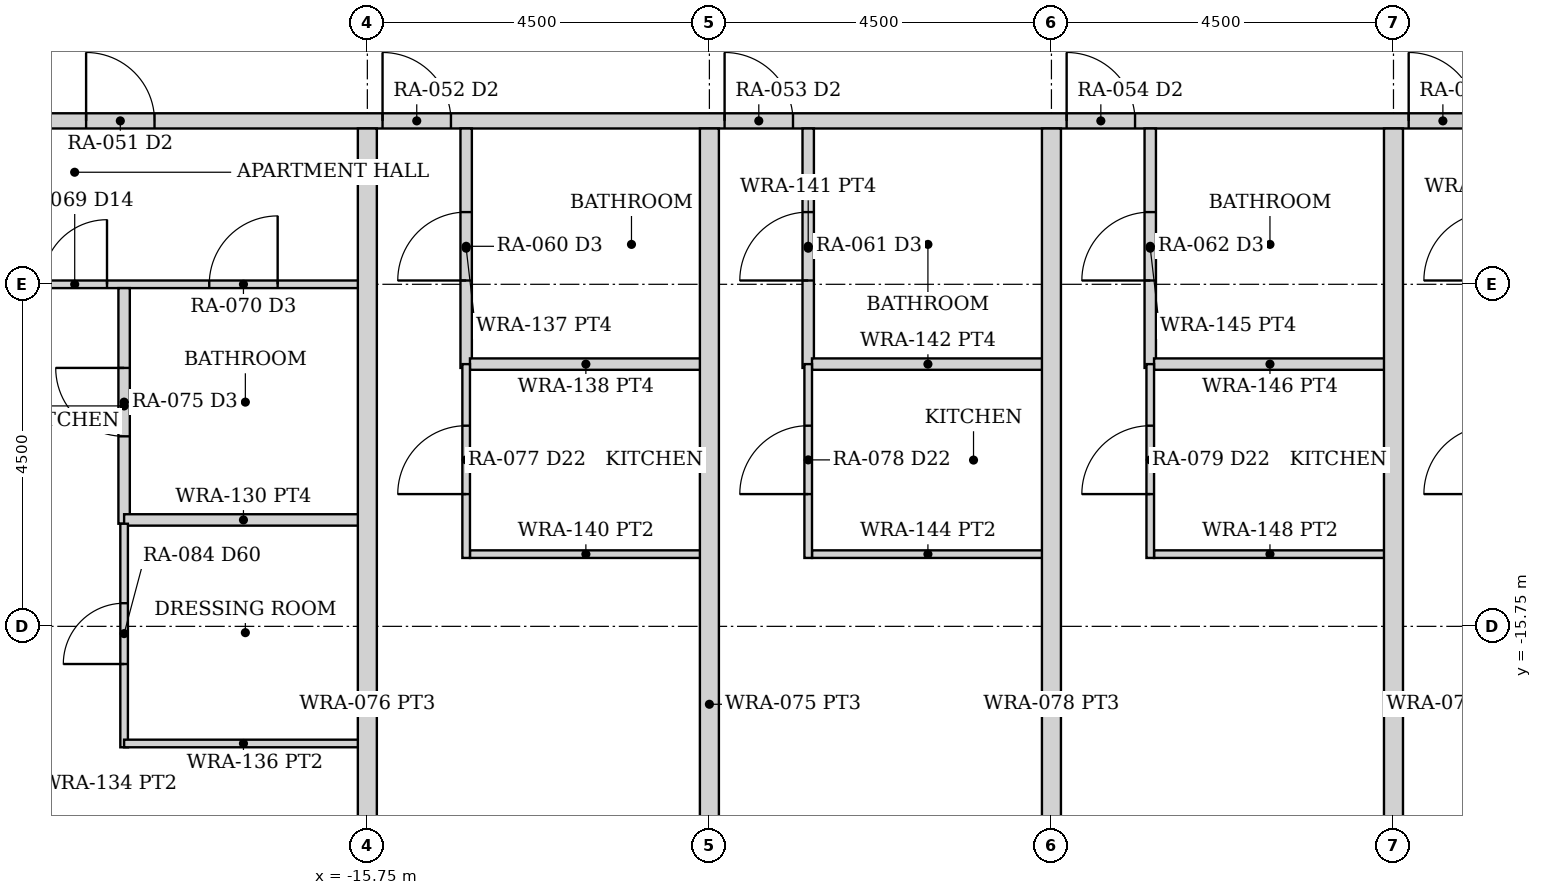
"""IFC4 building model, lengths in metres.
Left out: names, types, materials, properties, quantities, classifications, styles, units other than length and angle.
Written with IfcOpenShell. Run it as: python <this file> out.ifc"""

import sys

from ifc_helpers import new_model, si_unit, direction, frame, frame_2d, origin, place, context, subcontext, project, spatial, rectangle, extrude, element, fill, save


model = new_model("IFC4")
c1 = context("Model", 3, precision=1e-05, world=origin(), true_north=direction((0.0, 1.0)))
c2 = subcontext(c1, "Body", "Model", "MODEL_VIEW")
j1 = project(units=[si_unit("LENGTHUNIT", "METRE"), si_unit("PLANEANGLEUNIT", "RADIAN")], contexts=[c1])
p1 = place(None, origin())
s1 = spatial("IfcSite", under=j1, at=p1, CompositionType="ELEMENT")
p2 = place(p1, origin())
s2 = spatial("IfcBuilding", under=s1, at=p2, CompositionType="ELEMENT")
p3 = place(p2, frame((0.0, 0.0, 30.0)))
s3 = spatial("IfcBuildingStorey", under=s2, at=p3, CompositionType="ELEMENT", Elevation=30.0)
p4 = place(p3, frame((-24.55, -9.1, 0.0), z_axis=(0.0, 0.0, 1.0), x_axis=(1.0, 0.0, 0.0)))
e1 = element("IfcWall", 1, at=p4, inside=s3, PredefinedType="PARTITIONING", context=c2, shape_type="SweptSolid", body=[
    extrude(rectangle(XDim=49.1, YDim=0.2, at=frame_2d((24.55, 0.0))), origin(), (0.0, 0.0, 1.0), 2.373),
])
p5 = place(p4, frame((5.1, 0.0, 0.0)))
e2 = element("IfcOpeningElement", 2, at=p5, cuts=e1, PredefinedType="OPENING", context=c2, shape_type="SweptSolid", body=[
    extrude(rectangle(XDim=0.9, YDim=2.1, at=frame_2d((0.45, 1.05))), frame((0.0, 0.11, 0.0), z_axis=(0.0, -1.0, 0.0), x_axis=(1.0, 0.0, 0.0)), (0.0, 0.0, 1.0), 0.22),
])
p6 = place(p4, frame((9.0, 0.0, 0.0)))
e3 = element("IfcOpeningElement", 3, at=p6, cuts=e1, PredefinedType="OPENING", context=c2, shape_type="SweptSolid", body=[
    extrude(rectangle(XDim=0.9, YDim=2.1, at=frame_2d((0.45, 1.05))), frame((0.0, 0.11, 0.0), z_axis=(0.0, -1.0, 0.0), x_axis=(1.0, 0.0, 0.0)), (0.0, 0.0, 1.0), 0.22),
])
p7 = place(p4, frame((13.5, 0.0, 0.0)))
e4 = element("IfcOpeningElement", 4, at=p7, cuts=e1, PredefinedType="OPENING", context=c2, shape_type="SweptSolid", body=[
    extrude(rectangle(XDim=0.9, YDim=2.1, at=frame_2d((0.45, 1.05))), frame((0.0, 0.11, 0.0), z_axis=(0.0, -1.0, 0.0), x_axis=(1.0, 0.0, 0.0)), (0.0, 0.0, 1.0), 0.22),
])
p8 = place(p4, frame((18.0, 0.0, 0.0)))
e5 = element("IfcOpeningElement", 5, at=p8, cuts=e1, PredefinedType="OPENING", context=c2, shape_type="SweptSolid", body=[
    extrude(rectangle(XDim=0.9, YDim=2.1, at=frame_2d((0.45, 1.05))), frame((0.0, 0.11, 0.0), z_axis=(0.0, -1.0, 0.0), x_axis=(1.0, 0.0, 0.0)), (0.0, 0.0, 1.0), 0.22),
])
p9 = place(p4, frame((22.5, 0.0, 0.0)))
e6 = element("IfcOpeningElement", 6, at=p9, cuts=e1, PredefinedType="OPENING", context=c2, shape_type="SweptSolid", body=[
    extrude(rectangle(XDim=0.9, YDim=2.1, at=frame_2d((0.45, 1.05))), frame((0.0, 0.11, 0.0), z_axis=(0.0, -1.0, 0.0), x_axis=(1.0, 0.0, 0.0)), (0.0, 0.0, 1.0), 0.22),
])
p10 = place(p4, frame((27.0, 0.0, 0.0)))
e7 = element("IfcOpeningElement", 7, at=p10, cuts=e1, PredefinedType="OPENING", context=c2, shape_type="SweptSolid", body=[
    extrude(rectangle(XDim=0.9, YDim=2.1, at=frame_2d((0.45, 1.05))), frame((0.0, 0.11, 0.0), z_axis=(0.0, -1.0, 0.0), x_axis=(1.0, 0.0, 0.0)), (0.0, 0.0, 1.0), 0.22),
])
p11 = place(p4, frame((31.5, 0.0, 0.0)))
e8 = element("IfcOpeningElement", 8, at=p11, cuts=e1, PredefinedType="OPENING", context=c2, shape_type="SweptSolid", body=[
    extrude(rectangle(XDim=0.9, YDim=2.1, at=frame_2d((0.45, 1.05))), frame((0.0, 0.11, 0.0), z_axis=(0.0, -1.0, 0.0), x_axis=(1.0, 0.0, 0.0)), (0.0, 0.0, 1.0), 0.22),
])
p12 = place(p4, frame((36.0, 0.0, 0.0)))
e9 = element("IfcOpeningElement", 9, at=p12, cuts=e1, PredefinedType="OPENING", context=c2, shape_type="SweptSolid", body=[
    extrude(rectangle(XDim=0.9, YDim=2.1, at=frame_2d((0.45, 1.05))), frame((0.0, 0.11, 0.0), z_axis=(0.0, -1.0, 0.0), x_axis=(1.0, 0.0, 0.0)), (0.0, 0.0, 1.0), 0.22),
])
p13 = place(p4, frame((43.1, 0.0, 0.0)))
e10 = element("IfcOpeningElement", 10, at=p13, cuts=e1, PredefinedType="OPENING", context=c2, shape_type="SweptSolid", body=[
    extrude(rectangle(XDim=0.9, YDim=2.1, at=frame_2d((0.45, 1.05))), frame((0.0, 0.11, 0.0), z_axis=(0.0, -1.0, 0.0), x_axis=(1.0, 0.0, 0.0)), (0.0, 0.0, 1.0), 0.22),
])
p14 = place(p3, frame((-24.35, -11.25, 0.0), z_axis=(0.0, 0.0, 1.0), x_axis=(1.0, 0.0, 0.0)))
e11 = element("IfcWall", 11, at=p14, inside=s3, PredefinedType="PARTITIONING", context=c2, shape_type="SweptSolid", body=[
    extrude(rectangle(XDim=8.5, YDim=0.1, at=frame_2d((4.25, 0.0))), origin(), (0.0, 0.0, 1.0), 2.373),
])
p15 = place(p14, frame((2.375, 0.0, 0.0)))
e12 = element("IfcOpeningElement", 12, at=p15, cuts=e11, PredefinedType="OPENING", context=c2, shape_type="SweptSolid", body=[
    extrude(rectangle(XDim=0.9, YDim=2.1, at=frame_2d((0.45, 1.05))), frame((0.0, 0.06, 0.0), z_axis=(0.0, -1.0, 0.0), x_axis=(1.0, 0.0, 0.0)), (0.0, 0.0, 1.0), 0.12),
])
p16 = place(p14, frame((0.35, 0.0, 0.0)))
e13 = element("IfcOpeningElement", 13, at=p16, cuts=e11, PredefinedType="OPENING", context=c2, shape_type="SweptSolid", body=[
    extrude(rectangle(XDim=0.9, YDim=2.1, at=frame_2d((0.45, 1.05))), frame((0.0, 0.06, 0.0), z_axis=(0.0, -1.0, 0.0), x_axis=(1.0, 0.0, 0.0)), (0.0, 0.0, 1.0), 0.12),
])
p17 = place(p14, frame((4.325, 0.0, 0.0)))
e14 = element("IfcOpeningElement", 14, at=p17, cuts=e11, PredefinedType="OPENING", context=c2, shape_type="SweptSolid", body=[
    extrude(rectangle(XDim=0.85, YDim=2.1, at=frame_2d((0.425, 1.05))), frame((0.0, 0.06, 0.0), z_axis=(0.0, -1.0, 0.0), x_axis=(1.0, 0.0, 0.0)), (0.0, 0.0, 1.0), 0.12),
])
p18 = place(p14, frame((6.52, 0.0, 0.0)))
e15 = element("IfcOpeningElement", 15, at=p18, cuts=e11, PredefinedType="OPENING", context=c2, shape_type="SweptSolid", body=[
    extrude(rectangle(XDim=0.9, YDim=2.1, at=frame_2d((0.45, 1.05))), frame((0.0, 0.06, 0.0), z_axis=(0.0, -1.0, 0.0), x_axis=(1.0, 0.0, 0.0)), (0.0, 0.0, 1.0), 0.12),
])
p19 = place(p3, frame((-18.95, -14.4, 0.0), z_axis=(0.0, 0.0, 1.0), x_axis=(0.0, 1.0, 0.0)))
e16 = element("IfcWall", 16, at=p19, inside=s3, PredefinedType="PARTITIONING", context=c2, shape_type="SweptSolid", body=[
    extrude(rectangle(XDim=3.1, YDim=0.15, at=frame_2d((1.55, 0.0))), origin(), (0.0, 0.0, 1.0), 2.373),
])
p20 = place(p19, frame((1.15, 0.0, 0.0)))
e17 = element("IfcOpeningElement", 17, at=p20, cuts=e16, PredefinedType="OPENING", context=c2, shape_type="SweptSolid", body=[
    extrude(rectangle(XDim=0.9, YDim=2.1, at=frame_2d((0.45, 1.05))), frame((0.0, 0.085, 0.0), z_axis=(0.0, -1.0, 0.0), x_axis=(1.0, 0.0, 0.0)), (0.0, 0.0, 1.0), 0.17),
])
p21 = place(p3, frame((-18.95, -14.35, 0.0), z_axis=(0.0, 0.0, 1.0), x_axis=(1.0, 0.0, 0.0)))
e18 = element("IfcWall", 18, at=p21, inside=s3, PredefinedType="PARTITIONING", context=c2, shape_type="SweptSolid", body=[
    extrude(rectangle(XDim=3.14, YDim=0.15, at=frame_2d((1.57, 0.0))), origin(), (0.0, 0.0, 1.0), 2.373),
])
p22 = place(p3, frame((-18.95, -17.341, 0.0), z_axis=(0.0, 0.0, 1.0), x_axis=(0.0, 1.0, 0.0)))
e19 = element("IfcWall", 19, at=p22, inside=s3, PredefinedType="PARTITIONING", context=c2, shape_type="SweptSolid", body=[
    extrude(rectangle(XDim=2.941, YDim=0.1, at=frame_2d((1.47, 0.0))), origin(), (0.0, 0.0, 1.0), 2.373),
])
p23 = place(p22, frame((1.095, 0.0, 0.0)))
e20 = element("IfcOpeningElement", 20, at=p23, cuts=e19, PredefinedType="OPENING", context=c2, shape_type="SweptSolid", body=[
    extrude(rectangle(XDim=0.8, YDim=2.1, at=frame_2d((0.4, 1.05))), frame((0.0, 0.06, 0.0), z_axis=(0.0, -1.0, 0.0), x_axis=(1.0, 0.0, 0.0)), (0.0, 0.0, 1.0), 0.12),
])
p24 = place(p3, frame((-18.95, -17.291, 0.0), z_axis=(0.0, 0.0, 1.0), x_axis=(1.0, 0.0, 0.0)))
e21 = element("IfcWall", 21, at=p24, inside=s3, PredefinedType="PARTITIONING", context=c2, shape_type="SweptSolid", body=[
    extrude(rectangle(XDim=3.14, YDim=0.1, at=frame_2d((1.57, 0.0))), origin(), (0.0, 0.0, 1.0), 2.373),
])
p25 = place(p3, frame((-14.45, -12.35, 0.0), z_axis=(0.0, 0.0, 1.0), x_axis=(0.0, 1.0, 0.0)))
e22 = element("IfcWall", 22, at=p25, inside=s3, PredefinedType="PARTITIONING", context=c2, shape_type="SweptSolid", body=[
    extrude(rectangle(XDim=3.15, YDim=0.15, at=frame_2d((1.575, 0.0))), origin(), (0.0, 0.0, 1.0), 2.373),
])
p26 = place(p25, frame((1.15, 0.0, 0.0)))
e23 = element("IfcOpeningElement", 23, at=p26, cuts=e22, PredefinedType="OPENING", context=c2, shape_type="SweptSolid", body=[
    extrude(rectangle(XDim=0.9, YDim=2.1, at=frame_2d((0.45, 1.05))), frame((0.0, 0.085, 0.0), z_axis=(0.0, -1.0, 0.0), x_axis=(1.0, 0.0, 0.0)), (0.0, 0.0, 1.0), 0.17),
])
p27 = place(p3, frame((-14.4, -12.3, 0.0), z_axis=(0.0, 0.0, 1.0), x_axis=(1.0, 0.0, 0.0)))
e24 = element("IfcWall", 24, at=p27, inside=s3, PredefinedType="PARTITIONING", context=c2, shape_type="SweptSolid", body=[
    extrude(rectangle(XDim=3.05, YDim=0.15, at=frame_2d((1.525, 0.0))), origin(), (0.0, 0.0, 1.0), 2.373),
])
p28 = place(p3, frame((-14.4, -14.8, 0.0), z_axis=(0.0, 0.0, 1.0), x_axis=(1.0, 0.0, 0.0)))
e25 = element("IfcWall", 25, at=p28, inside=s3, PredefinedType="PARTITIONING", context=c2, shape_type="SweptSolid", body=[
    extrude(rectangle(XDim=3.05, YDim=0.1, at=frame_2d((1.525, 0.0))), origin(), (0.0, 0.0, 1.0), 2.373),
])
p29 = place(p3, frame((-14.45, -14.85, 0.0), z_axis=(0.0, 0.0, 1.0), x_axis=(0.0, 1.0, 0.0)))
e26 = element("IfcWall", 26, at=p29, inside=s3, PredefinedType="PARTITIONING", context=c2, shape_type="SweptSolid", body=[
    extrude(rectangle(XDim=2.55, YDim=0.1, at=frame_2d((1.275, 0.0))), origin(), (0.0, 0.0, 1.0), 2.373),
])
p30 = place(p29, frame((0.84, 0.0, 0.0)))
e27 = element("IfcOpeningElement", 27, at=p30, cuts=e26, PredefinedType="OPENING", context=c2, shape_type="SweptSolid", body=[
    extrude(rectangle(XDim=0.9, YDim=2.1, at=frame_2d((0.45, 1.05))), frame((0.0, 0.06, 0.0), z_axis=(0.0, -1.0, 0.0), x_axis=(1.0, 0.0, 0.0)), (0.0, 0.0, 1.0), 0.12),
])
p31 = place(p3, frame((-9.95, -12.35, 0.0), z_axis=(0.0, 0.0, 1.0), x_axis=(0.0, 1.0, 0.0)))
e28 = element("IfcWall", 28, at=p31, inside=s3, PredefinedType="PARTITIONING", context=c2, shape_type="SweptSolid", body=[
    extrude(rectangle(XDim=3.15, YDim=0.15, at=frame_2d((1.575, 0.0))), origin(), (0.0, 0.0, 1.0), 2.373),
])
p32 = place(p31, frame((1.15, 0.0, 0.0)))
e29 = element("IfcOpeningElement", 29, at=p32, cuts=e28, PredefinedType="OPENING", context=c2, shape_type="SweptSolid", body=[
    extrude(rectangle(XDim=0.9, YDim=2.1, at=frame_2d((0.45, 1.05))), frame((0.0, 0.085, 0.0), z_axis=(0.0, -1.0, 0.0), x_axis=(1.0, 0.0, 0.0)), (0.0, 0.0, 1.0), 0.17),
])
p33 = place(p3, frame((-9.9, -12.3, 0.0), z_axis=(0.0, 0.0, 1.0), x_axis=(1.0, 0.0, 0.0)))
e30 = element("IfcWall", 30, at=p33, inside=s3, PredefinedType="PARTITIONING", context=c2, shape_type="SweptSolid", body=[
    extrude(rectangle(XDim=3.05, YDim=0.15, at=frame_2d((1.525, 0.0))), origin(), (0.0, 0.0, 1.0), 2.373),
])
p34 = place(p3, frame((-9.9, -14.8, 0.0), z_axis=(0.0, 0.0, 1.0), x_axis=(1.0, 0.0, 0.0)))
e31 = element("IfcWall", 31, at=p34, inside=s3, PredefinedType="PARTITIONING", context=c2, shape_type="SweptSolid", body=[
    extrude(rectangle(XDim=3.05, YDim=0.1, at=frame_2d((1.525, 0.0))), origin(), (0.0, 0.0, 1.0), 2.373),
])
p35 = place(p3, frame((-9.95, -14.85, 0.0), z_axis=(0.0, 0.0, 1.0), x_axis=(0.0, 1.0, 0.0)))
e32 = element("IfcWall", 32, at=p35, inside=s3, PredefinedType="PARTITIONING", context=c2, shape_type="SweptSolid", body=[
    extrude(rectangle(XDim=2.55, YDim=0.1, at=frame_2d((1.275, 0.0))), origin(), (0.0, 0.0, 1.0), 2.373),
])
p36 = place(p35, frame((0.84, 0.0, 0.0)))
e33 = element("IfcOpeningElement", 33, at=p36, cuts=e32, PredefinedType="OPENING", context=c2, shape_type="SweptSolid", body=[
    extrude(rectangle(XDim=0.9, YDim=2.1, at=frame_2d((0.45, 1.05))), frame((0.0, 0.06, 0.0), z_axis=(0.0, -1.0, 0.0), x_axis=(1.0, 0.0, 0.0)), (0.0, 0.0, 1.0), 0.12),
])
p37 = place(p3, frame((-5.45, -12.35, 0.0), z_axis=(0.0, 0.0, 1.0), x_axis=(0.0, 1.0, 0.0)))
e34 = element("IfcWall", 34, at=p37, inside=s3, PredefinedType="PARTITIONING", context=c2, shape_type="SweptSolid", body=[
    extrude(rectangle(XDim=3.15, YDim=0.15, at=frame_2d((1.575, 0.0))), origin(), (0.0, 0.0, 1.0), 2.373),
])
p38 = place(p37, frame((1.15, 0.0, 0.0)))
e35 = element("IfcOpeningElement", 35, at=p38, cuts=e34, PredefinedType="OPENING", context=c2, shape_type="SweptSolid", body=[
    extrude(rectangle(XDim=0.9, YDim=2.1, at=frame_2d((0.45, 1.05))), frame((0.0, 0.085, 0.0), z_axis=(0.0, -1.0, 0.0), x_axis=(1.0, 0.0, 0.0)), (0.0, 0.0, 1.0), 0.17),
])
p39 = place(p3, frame((-5.4, -12.3, 0.0), z_axis=(0.0, 0.0, 1.0), x_axis=(1.0, 0.0, 0.0)))
e36 = element("IfcWall", 36, at=p39, inside=s3, PredefinedType="PARTITIONING", context=c2, shape_type="SweptSolid", body=[
    extrude(rectangle(XDim=3.05, YDim=0.15, at=frame_2d((1.525, 0.0))), origin(), (0.0, 0.0, 1.0), 2.373),
])
p40 = place(p3, frame((-5.4, -14.8, 0.0), z_axis=(0.0, 0.0, 1.0), x_axis=(1.0, 0.0, 0.0)))
e37 = element("IfcWall", 37, at=p40, inside=s3, PredefinedType="PARTITIONING", context=c2, shape_type="SweptSolid", body=[
    extrude(rectangle(XDim=3.05, YDim=0.1, at=frame_2d((1.525, 0.0))), origin(), (0.0, 0.0, 1.0), 2.373),
])
p41 = place(p3, frame((-5.45, -14.85, 0.0), z_axis=(0.0, 0.0, 1.0), x_axis=(0.0, 1.0, 0.0)))
e38 = element("IfcWall", 38, at=p41, inside=s3, PredefinedType="PARTITIONING", context=c2, shape_type="SweptSolid", body=[
    extrude(rectangle(XDim=2.55, YDim=0.1, at=frame_2d((1.275, 0.0))), origin(), (0.0, 0.0, 1.0), 2.373),
])
p42 = place(p41, frame((0.84, 0.0, 0.0)))
e39 = element("IfcOpeningElement", 39, at=p42, cuts=e38, PredefinedType="OPENING", context=c2, shape_type="SweptSolid", body=[
    extrude(rectangle(XDim=0.9, YDim=2.1, at=frame_2d((0.45, 1.05))), frame((0.0, 0.06, 0.0), z_axis=(0.0, -1.0, 0.0), x_axis=(1.0, 0.0, 0.0)), (0.0, 0.0, 1.0), 0.12),
])
for number, where, z_axis, x_axis in (
    (40, (-15.75, -24.35, 0.0), (0.0, 0.0, 1.0), (0.0, 1.0, 0.0)),
    (41, (-11.25, -24.35, 0.0), (0.0, 0.0, 1.0), (0.0, 1.0, 0.0)),
    (42, (-6.75, -24.35, 0.0), (0.0, 0.0, 1.0), (0.0, 1.0, 0.0)),
    (43, (-2.25, -24.35, 0.0), (0.0, 0.0, 1.0), (0.0, 1.0, 0.0)),
):
    element("IfcWall", number, at=place(p3, frame(where, z_axis=z_axis, x_axis=x_axis)), inside=s3, PredefinedType="PARTITIONING", context=c2, shape_type="SweptSolid", body=[
        extrude(rectangle(XDim=15.15, YDim=0.25, at=frame_2d((7.575, 0.0))), origin(), (0.0, 0.0, 1.0), 2.373),
    ])
p43 = place(p5, origin())
e44 = element("IfcDoor", 44, at=p43, inside=s3, OperationType="SINGLE_SWING_LEFT", PredefinedType="DOOR", context=c2, shape_type="SweptSolid", body=[
    extrude(rectangle(XDim=0.9, YDim=2.1, at=frame_2d((0.45, 1.05))), frame((0.0, 0.025, 0.0), z_axis=(0.0, -1.0, 0.0), x_axis=(1.0, 0.0, 0.0)), (0.0, 0.0, 1.0), 0.05),
])
fill(e2, e44)
p44 = place(p17, origin())
e45 = element("IfcDoor", 45, at=p44, inside=s3, OperationType="SINGLE_SWING_RIGHT", PredefinedType="DOOR", context=c2, shape_type="SweptSolid", body=[
    extrude(rectangle(XDim=0.85, YDim=2.1, at=frame_2d((0.425, 1.05))), frame((0.0, 0.025, 0.0), z_axis=(0.0, -1.0, 0.0), x_axis=(1.0, 0.0, 0.0)), (0.0, 0.0, 1.0), 0.05),
])
fill(e14, e45)
p45 = place(p20, origin())
e46 = element("IfcDoor", 46, at=p45, inside=s3, OperationType="SINGLE_SWING_RIGHT", PredefinedType="DOOR", context=c2, shape_type="SweptSolid", body=[
    extrude(rectangle(XDim=0.9, YDim=2.1, at=frame_2d((0.45, 1.05))), frame((0.0, 0.025, 0.0), z_axis=(0.0, -1.0, 0.0), x_axis=(1.0, 0.0, 0.0)), (0.0, 0.0, 1.0), 0.05),
])
fill(e17, e46)
p46 = place(p18, origin())
e47 = element("IfcDoor", 47, at=p46, inside=s3, OperationType="SINGLE_SWING_RIGHT", PredefinedType="DOOR", context=c2, shape_type="SweptSolid", body=[
    extrude(rectangle(XDim=0.9, YDim=2.1, at=frame_2d((0.45, 1.05))), frame((0.0, 0.025, 0.0), z_axis=(0.0, -1.0, 0.0), x_axis=(1.0, 0.0, 0.0)), (0.0, 0.0, 1.0), 0.05),
])
fill(e15, e47)
p47 = place(p23, origin())
e48 = element("IfcDoor", 48, at=p47, inside=s3, OperationType="SINGLE_SWING_LEFT", PredefinedType="DOOR", context=c2, shape_type="SweptSolid", body=[
    extrude(rectangle(XDim=0.8, YDim=2.1, at=frame_2d((0.4, 1.05))), frame((0.0, 0.025, 0.0), z_axis=(0.0, -1.0, 0.0), x_axis=(1.0, 0.0, 0.0)), (0.0, 0.0, 1.0), 0.05),
])
fill(e20, e48)
p48 = place(p6, origin())
e49 = element("IfcDoor", 49, at=p48, inside=s3, OperationType="SINGLE_SWING_LEFT", PredefinedType="DOOR", context=c2, shape_type="SweptSolid", body=[
    extrude(rectangle(XDim=0.9, YDim=2.1, at=frame_2d((0.45, 1.05))), frame((0.0, 0.025, 0.0), z_axis=(0.0, -1.0, 0.0), x_axis=(1.0, 0.0, 0.0)), (0.0, 0.0, 1.0), 0.05),
])
fill(e3, e49)
p49 = place(p26, origin())
e50 = element("IfcDoor", 50, at=p49, inside=s3, OperationType="SINGLE_SWING_LEFT", PredefinedType="DOOR", context=c2, shape_type="SweptSolid", body=[
    extrude(rectangle(XDim=0.9, YDim=2.1, at=frame_2d((0.45, 1.05))), frame((0.0, 0.025, 0.0), z_axis=(0.0, -1.0, 0.0), x_axis=(1.0, 0.0, 0.0)), (0.0, 0.0, 1.0), 0.05),
])
fill(e23, e50)
p50 = place(p30, origin())
e51 = element("IfcDoor", 51, at=p50, inside=s3, OperationType="SINGLE_SWING_LEFT", PredefinedType="DOOR", context=c2, shape_type="SweptSolid", body=[
    extrude(rectangle(XDim=0.9, YDim=2.1, at=frame_2d((0.45, 1.05))), frame((0.0, 0.025, 0.0), z_axis=(0.0, -1.0, 0.0), x_axis=(1.0, 0.0, 0.0)), (0.0, 0.0, 1.0), 0.05),
])
fill(e27, e51)
p51 = place(p7, origin())
e52 = element("IfcDoor", 52, at=p51, inside=s3, OperationType="SINGLE_SWING_LEFT", PredefinedType="DOOR", context=c2, shape_type="SweptSolid", body=[
    extrude(rectangle(XDim=0.9, YDim=2.1, at=frame_2d((0.45, 1.05))), frame((0.0, 0.025, 0.0), z_axis=(0.0, -1.0, 0.0), x_axis=(1.0, 0.0, 0.0)), (0.0, 0.0, 1.0), 0.05),
])
fill(e4, e52)
p52 = place(p32, origin())
e53 = element("IfcDoor", 53, at=p52, inside=s3, OperationType="SINGLE_SWING_LEFT", PredefinedType="DOOR", context=c2, shape_type="SweptSolid", body=[
    extrude(rectangle(XDim=0.9, YDim=2.1, at=frame_2d((0.45, 1.05))), frame((0.0, 0.025, 0.0), z_axis=(0.0, -1.0, 0.0), x_axis=(1.0, 0.0, 0.0)), (0.0, 0.0, 1.0), 0.05),
])
fill(e29, e53)
p53 = place(p36, origin())
e54 = element("IfcDoor", 54, at=p53, inside=s3, OperationType="SINGLE_SWING_LEFT", PredefinedType="DOOR", context=c2, shape_type="SweptSolid", body=[
    extrude(rectangle(XDim=0.9, YDim=2.1, at=frame_2d((0.45, 1.05))), frame((0.0, 0.025, 0.0), z_axis=(0.0, -1.0, 0.0), x_axis=(1.0, 0.0, 0.0)), (0.0, 0.0, 1.0), 0.05),
])
fill(e33, e54)
p54 = place(p8, origin())
e55 = element("IfcDoor", 55, at=p54, inside=s3, OperationType="SINGLE_SWING_LEFT", PredefinedType="DOOR", context=c2, shape_type="SweptSolid", body=[
    extrude(rectangle(XDim=0.9, YDim=2.1, at=frame_2d((0.45, 1.05))), frame((0.0, 0.025, 0.0), z_axis=(0.0, -1.0, 0.0), x_axis=(1.0, 0.0, 0.0)), (0.0, 0.0, 1.0), 0.05),
])
fill(e5, e55)
p55 = place(p38, origin())
e56 = element("IfcDoor", 56, at=p55, inside=s3, OperationType="SINGLE_SWING_LEFT", PredefinedType="DOOR", context=c2, shape_type="SweptSolid", body=[
    extrude(rectangle(XDim=0.9, YDim=2.1, at=frame_2d((0.45, 1.05))), frame((0.0, 0.025, 0.0), z_axis=(0.0, -1.0, 0.0), x_axis=(1.0, 0.0, 0.0)), (0.0, 0.0, 1.0), 0.05),
])
fill(e35, e56)
p56 = place(p42, origin())
e57 = element("IfcDoor", 57, at=p56, inside=s3, OperationType="SINGLE_SWING_LEFT", PredefinedType="DOOR", context=c2, shape_type="SweptSolid", body=[
    extrude(rectangle(XDim=0.9, YDim=2.1, at=frame_2d((0.45, 1.05))), frame((0.0, 0.025, 0.0), z_axis=(0.0, -1.0, 0.0), x_axis=(1.0, 0.0, 0.0)), (0.0, 0.0, 1.0), 0.05),
])
fill(e39, e57)
p57 = place(p9, origin())
e58 = element("IfcDoor", 58, at=p57, inside=s3, OperationType="SINGLE_SWING_LEFT", PredefinedType="DOOR", context=c2, shape_type="SweptSolid", body=[
    extrude(rectangle(XDim=0.9, YDim=2.1, at=frame_2d((0.45, 1.05))), frame((0.0, 0.025, 0.0), z_axis=(0.0, -1.0, 0.0), x_axis=(1.0, 0.0, 0.0)), (0.0, 0.0, 1.0), 0.05),
])
fill(e6, e58)
save(model, sys.argv[1])
